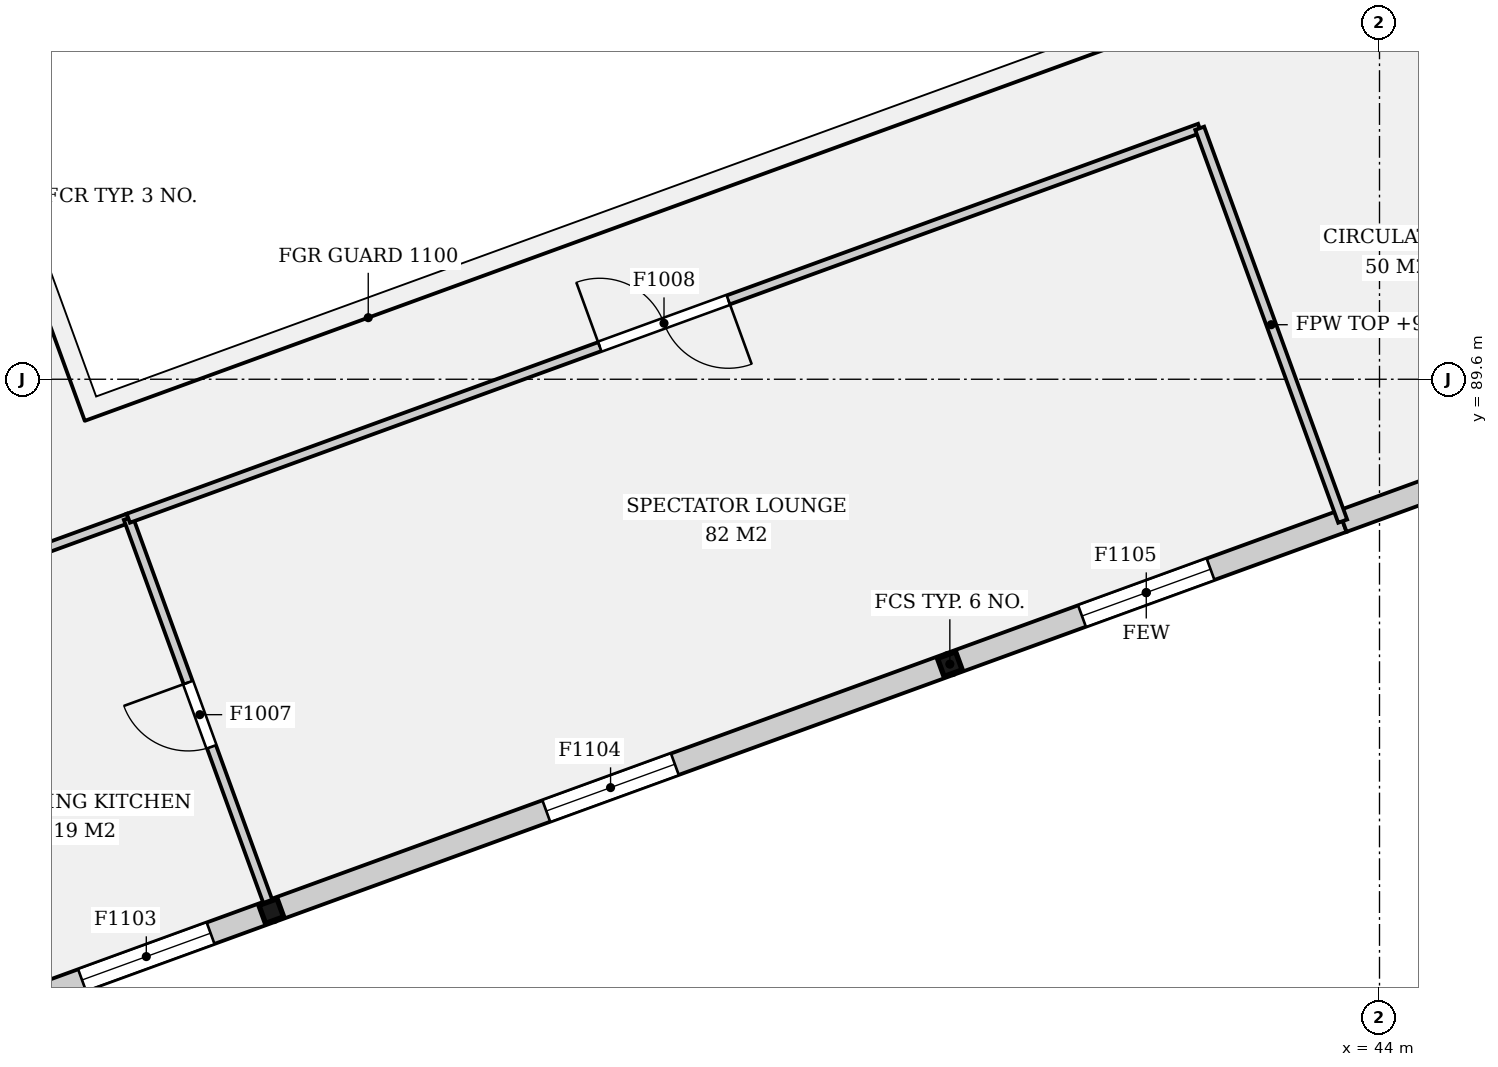
"""IFC4 building model, lengths in metres.
Left out: names, types, materials, properties, quantities, classifications, styles, units other than length and angle.
Written with IfcOpenShell. Run it as: python <this file> out.ifc"""

import sys

from ifc_helpers import new_model, si_unit, direction, frame, frame_2d, origin, origin_2d, place, context, subcontext, project, spatial, rectangle, hollow_rectangle, extrude, element, fill, save


model = new_model("IFC4")
c1 = context("Model", 3, precision=1e-05, world=origin(), true_north=direction((0.0, 1.0)))
c2 = subcontext(c1, "Body", "Model", "MODEL_VIEW")
j1 = project(units=[si_unit("LENGTHUNIT", "METRE"), si_unit("PLANEANGLEUNIT", "RADIAN")], contexts=[c1])
p1 = place(None, origin())
s1 = spatial("IfcSite", under=j1, at=p1, CompositionType="ELEMENT")
p2 = place(p1, origin())
s2 = spatial("IfcBuilding", under=s1, at=p2, CompositionType="ELEMENT")
p3 = place(p2, frame((0.0, 0.0, 5.0)))
s3 = spatial("IfcBuildingStorey", under=s2, at=p3, CompositionType="ELEMENT", Elevation=5.0)
for number, where, z_axis, x_axis in (
    (1, (29.42, 82.603, 0.0), (0.0, 0.0, 1.0), (0.94, 0.342, 0.0)),
    (2, (38.347, 85.852, 0.0), (0.0, 0.0, 1.0), (0.94, 0.342, 0.0)),
):
    element("IfcColumn", number, at=place(p3, frame(where, z_axis=z_axis, x_axis=x_axis)), inside=s3, PredefinedType="COLUMN", context=c2, shape_type="SweptSolid", body=[
        extrude(hollow_rectangle(XDim=0.254, YDim=0.254, WallThickness=0.012, at=origin_2d()), origin(), (0.0, 0.0, 1.0), 4.4),
    ])
p4 = place(p3, frame((26.131, 81.406, 0.0), z_axis=(0.0, 0.0, 1.0), x_axis=(0.939693585395, 0.342017493073, 0.0)))
e3 = element("IfcWall", 3, at=p4, inside=s3, PredefinedType="ELEMENTEDWALL", context=c2, shape_type="SweptSolid", body=[
    extrude(rectangle(XDim=3.5, YDim=0.3, at=frame_2d((1.75, 0.0))), origin(), (0.0, 0.0, 1.0), 3.703),
])
p5 = place(p4, frame((0.85, 0.0, 0.9)))
e4 = element("IfcOpeningElement", 4, at=p5, cuts=e3, PredefinedType="OPENING", context=c2, shape_type="SweptSolid", body=[
    extrude(rectangle(XDim=1.8, YDim=2.4, at=frame_2d((0.9, 1.2))), frame((0.0, 0.16, 0.0), z_axis=(0.0, -1.0, 0.0), x_axis=(1.0, 0.0, 0.0)), (0.0, 0.0, 1.0), 0.32),
])
p6 = place(p3, frame((29.42, 82.603, 0.0), z_axis=(0.0, 0.0, 1.0), x_axis=(0.939692088769, 0.342021605027, 0.0)))
e5 = element("IfcWall", 5, at=p6, inside=s3, PredefinedType="ELEMENTEDWALL", context=c2, shape_type="SweptSolid", body=[
    extrude(rectangle(XDim=9.5, YDim=0.3, at=frame_2d((4.75, 0.0))), origin(), (0.0, 0.0, 1.0), 3.703),
])
p7 = place(p6, frame((3.85, 0.0, 0.9)))
e6 = element("IfcOpeningElement", 6, at=p7, cuts=e5, PredefinedType="OPENING", context=c2, shape_type="SweptSolid", body=[
    extrude(rectangle(XDim=1.8, YDim=2.4, at=frame_2d((0.9, 1.2))), frame((0.0, 0.16, 0.0), z_axis=(0.0, -1.0, 0.0), x_axis=(1.0, 0.0, 0.0)), (0.0, 0.0, 1.0), 0.32),
])
p8 = place(p3, frame((38.347, 85.852, 0.0), z_axis=(0.0, 0.0, 1.0), x_axis=(0.939690992795, 0.34202461616, 0.0)))
e7 = element("IfcWall", 7, at=p8, inside=s3, PredefinedType="ELEMENTEDWALL", context=c2, shape_type="SweptSolid", body=[
    extrude(rectangle(XDim=5.5, YDim=0.3, at=frame_2d((2.75, 0.0))), origin(), (0.0, 0.0, 1.0), 4.4),
])
p9 = place(p8, frame((1.85, 0.0, 0.9)))
e8 = element("IfcOpeningElement", 8, at=p9, cuts=e7, PredefinedType="OPENING", context=c2, shape_type="SweptSolid", body=[
    extrude(rectangle(XDim=1.8, YDim=2.4, at=frame_2d((0.9, 1.2))), frame((0.0, 0.16, 0.0), z_axis=(0.0, -1.0, 0.0), x_axis=(1.0, 0.0, 0.0)), (0.0, 0.0, 1.0), 0.32),
])
p10 = place(p3, frame((43.516, 87.733, 0.0), z_axis=(0.0, 0.0, 1.0), x_axis=(0.939686455819, 0.342037080957, 0.0)))
e9 = element("IfcWall", 9, at=p10, inside=s3, PredefinedType="ELEMENTEDWALL", context=c2, shape_type="SweptSolid", body=[
    extrude(rectangle(XDim=4.0, YDim=0.3, at=frame_2d((2.0, 0.0))), origin(), (0.0, 0.0, 1.0), 4.4),
])
p11 = place(p3, frame((24.25, 86.574, 0.0), z_axis=(0.0, 0.0, 1.0), x_axis=(0.939671164665, 0.342079087782, 0.0)))
e10 = element("IfcWall", 10, at=p11, inside=s3, PredefinedType="PARTITIONING", context=c2, shape_type="SweptSolid", body=[
    extrude(rectangle(XDim=3.5, YDim=0.125, at=frame_2d((1.75, 0.0))), origin(), (0.0, 0.0, 1.0), 3.703),
])
p12 = place(p3, frame((29.42, 82.603, 0.0), z_axis=(0.0, 0.0, 1.0), x_axis=(-0.342010349897, 0.939696185245, 0.0)))
e11 = element("IfcWall", 11, at=p12, inside=s3, PredefinedType="PARTITIONING", context=c2, shape_type="SweptSolid", body=[
    extrude(rectangle(XDim=5.5, YDim=0.125, at=frame_2d((2.75, 0.0))), origin(), (0.0, 0.0, 1.0), 3.703),
])
p13 = place(p12, frame((2.3, 0.0, 0.0)))
e12 = element("IfcOpeningElement", 12, at=p13, cuts=e11, PredefinedType="OPENING", context=c2, shape_type="SweptSolid", body=[
    extrude(rectangle(XDim=0.9, YDim=2.1, at=frame_2d((0.45, 1.05))), frame((0.0, 0.073, 0.0), z_axis=(0.0, -1.0, 0.0), x_axis=(1.0, 0.0, 0.0)), (0.0, 0.0, 1.0), 0.145),
])
p14 = place(p3, frame((27.539, 87.771, 0.0), z_axis=(0.0, 0.0, 1.0), x_axis=(0.939696917863, 0.342008336972, 0.0)))
e13 = element("IfcWall", 13, at=p14, inside=s3, PredefinedType="PARTITIONING", context=c2, shape_type="SweptSolid", body=[
    extrude(rectangle(XDim=15.0, YDim=0.125, at=frame_2d((7.5, 0.0))), origin(), (0.0, 0.0, 1.0), 3.703),
])
p15 = place(p14, frame((6.6, 0.0, 0.0)))
e14 = element("IfcOpeningElement", 14, at=p15, cuts=e13, PredefinedType="OPENING", context=c2, shape_type="SweptSolid", body=[
    extrude(rectangle(XDim=1.8, YDim=2.1, at=frame_2d((0.9, 1.05))), frame((0.0, 0.073, 0.0), z_axis=(0.0, -1.0, 0.0), x_axis=(1.0, 0.0, 0.0)), (0.0, 0.0, 1.0), 0.145),
])
p16 = place(p3, frame((43.516, 87.733, 0.0), z_axis=(0.0, 0.0, 1.0), x_axis=(-0.34202461616, 0.939690992795, 0.0)))
e15 = element("IfcWall", 15, at=p16, inside=s3, PredefinedType="PARTITIONING", context=c2, shape_type="SweptSolid", body=[
    extrude(rectangle(XDim=5.5, YDim=0.125, at=frame_2d((2.75, 0.0))), origin(), (0.0, 0.0, 1.0), 4.12),
])
p17 = place(p5, origin())
e16 = element("IfcWindow", 16, at=p17, inside=s3, PartitioningType="SINGLE_PANEL", PredefinedType="WINDOW", context=c2, shape_type="SweptSolid", body=[
    extrude(rectangle(XDim=1.8, YDim=2.4, at=frame_2d((0.9, 1.2))), frame((0.0, 0.03, 0.0), z_axis=(0.0, -1.0, 0.0), x_axis=(1.0, 0.0, 0.0)), (0.0, 0.0, 1.0), 0.06),
])
fill(e4, e16)
p18 = place(p7, origin())
e17 = element("IfcWindow", 17, at=p18, inside=s3, PartitioningType="SINGLE_PANEL", PredefinedType="WINDOW", context=c2, shape_type="SweptSolid", body=[
    extrude(rectangle(XDim=1.8, YDim=2.4, at=frame_2d((0.9, 1.2))), frame((0.0, 0.03, 0.0), z_axis=(0.0, -1.0, 0.0), x_axis=(1.0, 0.0, 0.0)), (0.0, 0.0, 1.0), 0.06),
])
fill(e6, e17)
p19 = place(p9, origin())
e18 = element("IfcWindow", 18, at=p19, inside=s3, PartitioningType="SINGLE_PANEL", PredefinedType="WINDOW", context=c2, shape_type="SweptSolid", body=[
    extrude(rectangle(XDim=1.8, YDim=2.4, at=frame_2d((0.9, 1.2))), frame((0.0, 0.03, 0.0), z_axis=(0.0, -1.0, 0.0), x_axis=(1.0, 0.0, 0.0)), (0.0, 0.0, 1.0), 0.06),
])
fill(e8, e18)
p20 = place(p13, origin())
e19 = element("IfcDoor", 19, at=p20, inside=s3, OperationType="SINGLE_SWING_RIGHT", PredefinedType="DOOR", context=c2, shape_type="SweptSolid", body=[
    extrude(rectangle(XDim=0.9, YDim=2.1, at=frame_2d((0.45, 1.05))), frame((0.0, 0.025, 0.0), z_axis=(0.0, -1.0, 0.0), x_axis=(1.0, 0.0, 0.0)), (0.0, 0.0, 1.0), 0.05),
])
fill(e12, e19)
p21 = place(p15, origin())
e20 = element("IfcDoor", 20, at=p21, inside=s3, OperationType="DOUBLE_DOOR_SINGLE_SWING", PredefinedType="DOOR", context=c2, shape_type="SweptSolid", body=[
    extrude(rectangle(XDim=1.8, YDim=2.1, at=frame_2d((0.9, 1.05))), frame((0.0, 0.025, 0.0), z_axis=(0.0, -1.0, 0.0), x_axis=(1.0, 0.0, 0.0)), (0.0, 0.0, 1.0), 0.05),
])
fill(e14, e20)
save(model, sys.argv[1])
